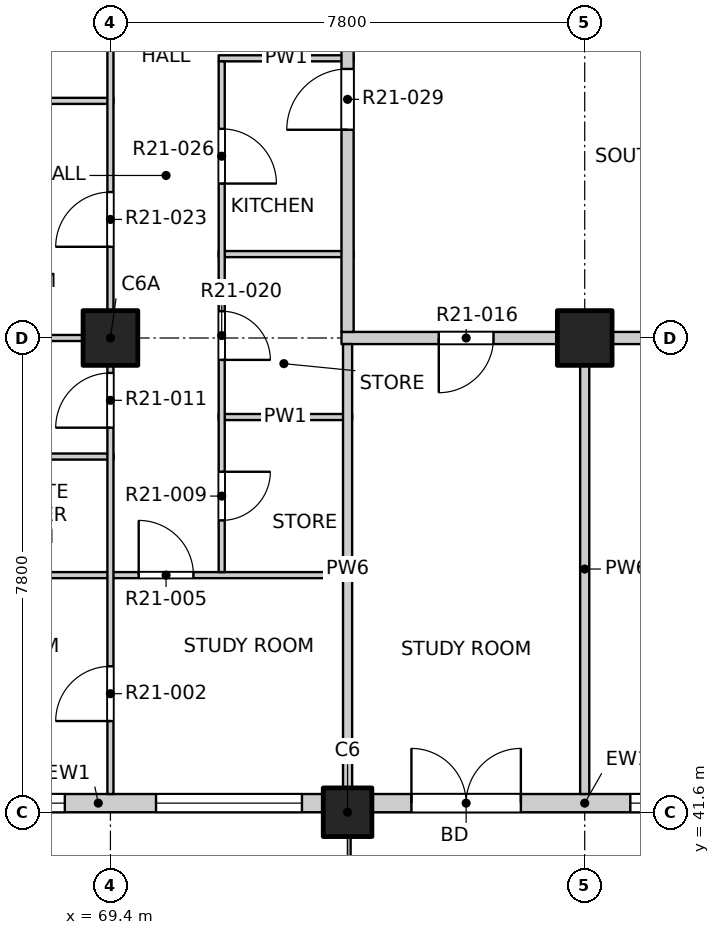
"""IFC4 building model, lengths in metres.
Left out: names, types, materials, properties, quantities, classifications, styles, units other than length and angle.
Written with IfcOpenShell. Run it as: python <this file> out.ifc"""

import sys

from ifc_helpers import new_model, si_unit, direction, frame, frame_2d, origin, origin_2d, place, context, subcontext, project, spatial, rectangle, extrude, element, fill, save


model = new_model("IFC4")
c1 = context("Model", 3, precision=1e-05, world=origin(), true_north=direction((0.0, 1.0)))
c2 = subcontext(c1, "Body", "Model", "MODEL_VIEW")
j1 = project(units=[si_unit("LENGTHUNIT", "METRE"), si_unit("PLANEANGLEUNIT", "RADIAN")], contexts=[c1])
p1 = place(None, origin())
s1 = spatial("IfcSite", under=j1, at=p1, CompositionType="ELEMENT")
p2 = place(p1, origin())
s2 = spatial("IfcBuilding", under=s1, at=p2, CompositionType="ELEMENT")
p3 = place(p2, frame((0.0, 0.0, 214.3)))
s3 = spatial("IfcBuildingStorey", under=s2, at=p3, CompositionType="ELEMENT", Elevation=214.3)
p4 = place(p3, frame((73.3, 41.6, -0.25), z_axis=(0.0, 0.0, 1.0), x_axis=(1.0, 0.0, 0.0)))
e1 = element("IfcColumn", 1, at=p4, inside=s3, PredefinedType="COLUMN", context=c2, shape_type="SweptSolid", body=[
    extrude(rectangle(XDim=0.8, YDim=0.8, at=origin_2d()), origin(), (0.0, 0.0, 1.0), 3.4),
])
for number, where, z_axis, x_axis in (
    (2, (69.4, 49.4, -0.25), (0.0, 0.0, 1.0), (1.0, 0.0, 0.0)),
    (3, (77.2, 49.4, -0.25), (0.0, 0.0, 1.0), (1.0, 0.0, 0.0)),
):
    element("IfcColumn", number, at=place(p3, frame(where, z_axis=z_axis, x_axis=x_axis)), inside=s3, PredefinedType="COLUMN", context=c2, shape_type="SweptSolid", body=[
        extrude(rectangle(XDim=0.9, YDim=0.9, at=origin_2d()), origin(), (0.0, 0.0, 1.0), 3.4),
    ])
p5 = place(p3, frame((65.5, 41.75, 0.0), z_axis=(0.0, 0.0, 1.0), x_axis=(1.0, 0.0, 0.0)))
e4 = element("IfcWall", 4, at=p5, inside=s3, PredefinedType="SOLIDWALL", context=c2, shape_type="SweptSolid", body=[
    extrude(rectangle(XDim=7.4, YDim=0.3, at=frame_2d((3.7, 0.0))), origin(), (0.0, 0.0, 1.0), 2.7),
])
p6 = place(p5, frame((0.75, 0.0, 0.9)))
e5 = element("IfcOpeningElement", 5, at=p6, cuts=e4, PredefinedType="OPENING", context=c2, shape_type="SweptSolid", body=[
    extrude(rectangle(XDim=2.4, YDim=1.8, at=frame_2d((1.2, 0.9))), frame((0.0, 0.16, 0.0), z_axis=(0.0, -1.0, 0.0), x_axis=(1.0, 0.0, 0.0)), (0.0, 0.0, 1.0), 0.32),
])
p7 = place(p5, frame((4.65, 0.0, 0.9)))
e6 = element("IfcOpeningElement", 6, at=p7, cuts=e4, PredefinedType="OPENING", context=c2, shape_type="SweptSolid", body=[
    extrude(rectangle(XDim=2.4, YDim=1.8, at=frame_2d((1.2, 0.9))), frame((0.0, 0.16, 0.0), z_axis=(0.0, -1.0, 0.0), x_axis=(1.0, 0.0, 0.0)), (0.0, 0.0, 1.0), 0.32),
])
p8 = place(p3, frame((73.7, 41.75, 0.0), z_axis=(0.0, 0.0, 1.0), x_axis=(1.0, 0.0, 0.0)))
e7 = element("IfcWall", 7, at=p8, inside=s3, PredefinedType="SOLIDWALL", context=c2, shape_type="SweptSolid", body=[
    extrude(rectangle(XDim=7.0, YDim=0.3, at=frame_2d((3.5, 0.0))), origin(), (0.0, 0.0, 1.0), 2.7),
])
p9 = place(p8, frame((0.65, 0.0, 0.0)))
e8 = element("IfcOpeningElement", 8, at=p9, cuts=e7, PredefinedType="OPENING", context=c2, shape_type="SweptSolid", body=[
    extrude(rectangle(XDim=1.8, YDim=2.4, at=frame_2d((0.9, 1.2))), frame((0.0, 0.16, 0.0), z_axis=(0.0, -1.0, 0.0), x_axis=(1.0, 0.0, 0.0)), (0.0, 0.0, 1.0), 0.32),
])
p10 = place(p8, frame((4.25, 0.0, 0.9)))
e9 = element("IfcOpeningElement", 9, at=p10, cuts=e7, PredefinedType="OPENING", context=c2, shape_type="SweptSolid", body=[
    extrude(rectangle(XDim=2.4, YDim=1.8, at=frame_2d((1.2, 0.9))), frame((0.0, 0.16, 0.0), z_axis=(0.0, -1.0, 0.0), x_axis=(1.0, 0.0, 0.0)), (0.0, 0.0, 1.0), 0.32),
])
p11 = place(p3, frame((61.9, 45.5, 0.0), z_axis=(0.0, 0.0, 1.0), x_axis=(1.0, 0.0, 0.0)))
e10 = element("IfcWall", 10, at=p11, inside=s3, PredefinedType="PARTITIONING", context=c2, shape_type="SweptSolid", body=[
    extrude(rectangle(XDim=11.475, YDim=0.1, at=frame_2d((5.737, 0.0))), origin(), (0.0, 0.0, 1.0), 3.15),
])
p12 = place(p11, frame((7.965, 0.0, 0.0)))
e11 = element("IfcOpeningElement", 11, at=p12, cuts=e10, PredefinedType="OPENING", context=c2, shape_type="SweptSolid", body=[
    extrude(rectangle(XDim=0.9, YDim=2.1, at=frame_2d((0.45, 1.05))), frame((0.0, 0.06, 0.0), z_axis=(0.0, -1.0, 0.0), x_axis=(1.0, 0.0, 0.0)), (0.0, 0.0, 1.0), 0.12),
])
p13 = place(p3, frame((65.9, 47.45, 0.0), z_axis=(0.0, 0.0, 1.0), x_axis=(1.0, 0.0, 0.0)))
e12 = element("IfcWall", 12, at=p13, inside=s3, PredefinedType="PARTITIONING", context=c2, shape_type="SweptSolid", body=[
    extrude(rectangle(XDim=3.55, YDim=0.1, at=frame_2d((1.775, 0.0))), origin(), (0.0, 0.0, 1.0), 3.15),
])
p14 = place(p3, frame((71.18, 48.1, 0.0), z_axis=(0.0, 0.0, 1.0), x_axis=(1.0, 0.0, 0.0)))
e13 = element("IfcWall", 13, at=p14, inside=s3, PredefinedType="PARTITIONING", context=c2, shape_type="SweptSolid", body=[
    extrude(rectangle(XDim=2.195, YDim=0.1, at=frame_2d((1.097, 0.0))), origin(), (0.0, 0.0, 1.0), 3.15),
])
p15 = place(p3, frame((61.9, 49.4, 0.0), z_axis=(0.0, 0.0, 1.0), x_axis=(1.0, 0.0, 0.0)))
e14 = element("IfcWall", 14, at=p15, inside=s3, PredefinedType="PARTITIONING", context=c2, shape_type="SweptSolid", body=[
    extrude(rectangle(XDim=7.55, YDim=0.1, at=frame_2d((3.775, 0.0))), origin(), (0.0, 0.0, 1.0), 3.15),
])
p16 = place(p3, frame((73.2, 49.4, 0.0), z_axis=(0.0, 0.0, 1.0), x_axis=(1.0, 0.0, 0.0)))
e15 = element("IfcWall", 15, at=p16, inside=s3, PredefinedType="PARTITIONING", context=c2, shape_type="SweptSolid", body=[
    extrude(rectangle(XDim=23.6, YDim=0.2, at=frame_2d((11.8, 0.0))), origin(), (0.0, 0.0, 1.0), 3.15),
])
p17 = place(p16, frame((1.6, 0.0, 0.0)))
e16 = element("IfcOpeningElement", 16, at=p17, cuts=e15, PredefinedType="OPENING", context=c2, shape_type="SweptSolid", body=[
    extrude(rectangle(XDim=0.9, YDim=2.1, at=frame_2d((0.45, 1.05))), frame((0.0, 0.11, 0.0), z_axis=(0.0, -1.0, 0.0), x_axis=(1.0, 0.0, 0.0)), (0.0, 0.0, 1.0), 0.22),
])
p18 = place(p16, frame((7.3, 0.0, 0.0)))
e17 = element("IfcOpeningElement", 17, at=p18, cuts=e15, PredefinedType="OPENING", context=c2, shape_type="SweptSolid", body=[
    extrude(rectangle(XDim=1.2, YDim=2.1, at=frame_2d((0.6, 1.05))), frame((0.0, 0.11, 0.0), z_axis=(0.0, -1.0, 0.0), x_axis=(1.0, 0.0, 0.0)), (0.0, 0.0, 1.0), 0.22),
])
p19 = place(p16, frame((13.3, 0.0, 0.0)))
e18 = element("IfcOpeningElement", 18, at=p19, cuts=e15, PredefinedType="OPENING", context=c2, shape_type="SweptSolid", body=[
    extrude(rectangle(XDim=0.9, YDim=2.1, at=frame_2d((0.45, 1.05))), frame((0.0, 0.11, 0.0), z_axis=(0.0, -1.0, 0.0), x_axis=(1.0, 0.0, 0.0)), (0.0, 0.0, 1.0), 0.22),
])
p20 = place(p16, frame((20.175, 0.0, 0.0)))
e19 = element("IfcOpeningElement", 19, at=p20, cuts=e15, PredefinedType="OPENING", context=c2, shape_type="SweptSolid", body=[
    extrude(rectangle(XDim=1.2, YDim=2.1, at=frame_2d((0.6, 1.05))), frame((0.0, 0.11, 0.0), z_axis=(0.0, -1.0, 0.0), x_axis=(1.0, 0.0, 0.0)), (0.0, 0.0, 1.0), 0.22),
])
p21 = place(p3, frame((71.18, 50.78, 0.0), z_axis=(0.0, 0.0, 1.0), x_axis=(1.0, 0.0, 0.0)))
e20 = element("IfcWall", 20, at=p21, inside=s3, PredefinedType="PARTITIONING", context=c2, shape_type="SweptSolid", body=[
    extrude(rectangle(XDim=2.22, YDim=0.1, at=frame_2d((1.11, 0.0))), origin(), (0.0, 0.0, 1.0), 3.15),
])
p22 = place(p3, frame((61.9, 53.3, 0.0), z_axis=(0.0, 0.0, 1.0), x_axis=(1.0, 0.0, 0.0)))
e21 = element("IfcWall", 21, at=p22, inside=s3, PredefinedType="PARTITIONING", context=c2, shape_type="SweptSolid", body=[
    extrude(rectangle(XDim=7.55, YDim=0.1, at=frame_2d((3.775, 0.0))), origin(), (0.0, 0.0, 1.0), 3.15),
])
p23 = place(p3, frame((71.18, 54.0, 0.0), z_axis=(0.0, 0.0, 1.0), x_axis=(1.0, 0.0, 0.0)))
e22 = element("IfcWall", 22, at=p23, inside=s3, PredefinedType="PARTITIONING", context=c2, shape_type="SweptSolid", body=[
    extrude(rectangle(XDim=2.22, YDim=0.1, at=frame_2d((1.11, 0.0))), origin(), (0.0, 0.0, 1.0), 3.15),
])
p24 = place(p3, frame((69.4, 41.9, 0.0), z_axis=(0.0, 0.0, 1.0), x_axis=(0.0, 1.0, 0.0)))
e23 = element("IfcWall", 23, at=p24, inside=s3, PredefinedType="PARTITIONING", context=c2, shape_type="SweptSolid", body=[
    extrude(rectangle(XDim=46.2, YDim=0.1, at=frame_2d((23.1, 0.0))), origin(), (0.0, 0.0, 1.0), 3.15),
])
p25 = place(p24, frame((1.2, 0.0, 0.0)))
e24 = element("IfcOpeningElement", 24, at=p25, cuts=e23, PredefinedType="OPENING", context=c2, shape_type="SweptSolid", body=[
    extrude(rectangle(XDim=0.9, YDim=2.1, at=frame_2d((0.45, 1.05))), frame((0.0, 0.06, 0.0), z_axis=(0.0, -1.0, 0.0), x_axis=(1.0, 0.0, 0.0)), (0.0, 0.0, 1.0), 0.12),
])
p26 = place(p24, frame((6.025, 0.0, 0.0)))
e25 = element("IfcOpeningElement", 25, at=p26, cuts=e23, PredefinedType="OPENING", context=c2, shape_type="SweptSolid", body=[
    extrude(rectangle(XDim=0.9, YDim=2.1, at=frame_2d((0.45, 1.05))), frame((0.0, 0.06, 0.0), z_axis=(0.0, -1.0, 0.0), x_axis=(1.0, 0.0, 0.0)), (0.0, 0.0, 1.0), 0.12),
])
p27 = place(p24, frame((9.0, 0.0, 0.0)))
e26 = element("IfcOpeningElement", 26, at=p27, cuts=e23, PredefinedType="OPENING", context=c2, shape_type="SweptSolid", body=[
    extrude(rectangle(XDim=0.9, YDim=2.1, at=frame_2d((0.45, 1.05))), frame((0.0, 0.06, 0.0), z_axis=(0.0, -1.0, 0.0), x_axis=(1.0, 0.0, 0.0)), (0.0, 0.0, 1.0), 0.12),
])
p28 = place(p24, frame((12.9, 0.0, 0.0)))
e27 = element("IfcOpeningElement", 27, at=p28, cuts=e23, PredefinedType="OPENING", context=c2, shape_type="SweptSolid", body=[
    extrude(rectangle(XDim=0.9, YDim=2.1, at=frame_2d((0.45, 1.05))), frame((0.0, 0.06, 0.0), z_axis=(0.0, -1.0, 0.0), x_axis=(1.0, 0.0, 0.0)), (0.0, 0.0, 1.0), 0.12),
])
p29 = place(p24, frame((17.775, 0.0, 0.0)))
e28 = element("IfcOpeningElement", 28, at=p29, cuts=e23, PredefinedType="OPENING", context=c2, shape_type="SweptSolid", body=[
    extrude(rectangle(XDim=0.9, YDim=2.1, at=frame_2d((0.45, 1.05))), frame((0.0, 0.06, 0.0), z_axis=(0.0, -1.0, 0.0), x_axis=(1.0, 0.0, 0.0)), (0.0, 0.0, 1.0), 0.12),
])
p30 = place(p24, frame((20.7, 0.0, 0.0)))
e29 = element("IfcOpeningElement", 29, at=p30, cuts=e23, PredefinedType="OPENING", context=c2, shape_type="SweptSolid", body=[
    extrude(rectangle(XDim=0.9, YDim=2.1, at=frame_2d((0.45, 1.05))), frame((0.0, 0.06, 0.0), z_axis=(0.0, -1.0, 0.0), x_axis=(1.0, 0.0, 0.0)), (0.0, 0.0, 1.0), 0.12),
])
p31 = place(p24, frame((24.6, 0.0, 0.0)))
e30 = element("IfcOpeningElement", 30, at=p31, cuts=e23, PredefinedType="OPENING", context=c2, shape_type="SweptSolid", body=[
    extrude(rectangle(XDim=0.9, YDim=2.1, at=frame_2d((0.45, 1.05))), frame((0.0, 0.06, 0.0), z_axis=(0.0, -1.0, 0.0), x_axis=(1.0, 0.0, 0.0)), (0.0, 0.0, 1.0), 0.12),
])
p32 = place(p24, frame((29.425, 0.0, 0.0)))
e31 = element("IfcOpeningElement", 31, at=p32, cuts=e23, PredefinedType="OPENING", context=c2, shape_type="SweptSolid", body=[
    extrude(rectangle(XDim=0.9, YDim=2.1, at=frame_2d((0.45, 1.05))), frame((0.0, 0.06, 0.0), z_axis=(0.0, -1.0, 0.0), x_axis=(1.0, 0.0, 0.0)), (0.0, 0.0, 1.0), 0.12),
])
p33 = place(p24, frame((33.375, 0.0, 0.0)))
e32 = element("IfcOpeningElement", 32, at=p33, cuts=e23, PredefinedType="OPENING", context=c2, shape_type="SweptSolid", body=[
    extrude(rectangle(XDim=0.9, YDim=2.1, at=frame_2d((0.45, 1.05))), frame((0.0, 0.06, 0.0), z_axis=(0.0, -1.0, 0.0), x_axis=(1.0, 0.0, 0.0)), (0.0, 0.0, 1.0), 0.12),
])
p34 = place(p24, frame((36.3, 0.0, 0.0)))
e33 = element("IfcOpeningElement", 33, at=p34, cuts=e23, PredefinedType="OPENING", context=c2, shape_type="SweptSolid", body=[
    extrude(rectangle(XDim=0.9, YDim=2.1, at=frame_2d((0.45, 1.05))), frame((0.0, 0.06, 0.0), z_axis=(0.0, -1.0, 0.0), x_axis=(1.0, 0.0, 0.0)), (0.0, 0.0, 1.0), 0.12),
])
p35 = place(p24, frame((41.175, 0.0, 0.0)))
e34 = element("IfcOpeningElement", 34, at=p35, cuts=e23, PredefinedType="OPENING", context=c2, shape_type="SweptSolid", body=[
    extrude(rectangle(XDim=0.9, YDim=2.1, at=frame_2d((0.45, 1.05))), frame((0.0, 0.06, 0.0), z_axis=(0.0, -1.0, 0.0), x_axis=(1.0, 0.0, 0.0)), (0.0, 0.0, 1.0), 0.12),
])
p36 = place(p24, frame((44.1, 0.0, 0.0)))
e35 = element("IfcOpeningElement", 35, at=p36, cuts=e23, PredefinedType="OPENING", context=c2, shape_type="SweptSolid", body=[
    extrude(rectangle(XDim=0.9, YDim=2.1, at=frame_2d((0.45, 1.05))), frame((0.0, 0.06, 0.0), z_axis=(0.0, -1.0, 0.0), x_axis=(1.0, 0.0, 0.0)), (0.0, 0.0, 1.0), 0.12),
])
p37 = place(p3, frame((71.23, 45.55, 0.0), z_axis=(0.0, 0.0, 1.0), x_axis=(0.0, 1.0, 0.0)))
e36 = element("IfcWall", 36, at=p37, inside=s3, PredefinedType="PARTITIONING", context=c2, shape_type="SweptSolid", body=[
    extrude(rectangle(XDim=8.4, YDim=0.1, at=frame_2d((4.2, 0.0))), origin(), (0.0, 0.0, 1.0), 3.15),
])
p38 = place(p37, frame((0.85, 0.0, 0.0)))
e37 = element("IfcOpeningElement", 37, at=p38, cuts=e36, PredefinedType="OPENING", context=c2, shape_type="SweptSolid", body=[
    extrude(rectangle(XDim=0.8, YDim=2.1, at=frame_2d((0.4, 1.05))), frame((0.0, 0.06, 0.0), z_axis=(0.0, -1.0, 0.0), x_axis=(1.0, 0.0, 0.0)), (0.0, 0.0, 1.0), 0.12),
])
p39 = place(p37, frame((3.49, 0.0, 0.0)))
e38 = element("IfcOpeningElement", 38, at=p39, cuts=e36, PredefinedType="OPENING", context=c2, shape_type="SweptSolid", body=[
    extrude(rectangle(XDim=0.8, YDim=2.1, at=frame_2d((0.4, 1.05))), frame((0.0, 0.06, 0.0), z_axis=(0.0, -1.0, 0.0), x_axis=(1.0, 0.0, 0.0)), (0.0, 0.0, 1.0), 0.12),
])
p40 = place(p37, frame((6.39, 0.0, 0.0)))
e39 = element("IfcOpeningElement", 39, at=p40, cuts=e36, PredefinedType="OPENING", context=c2, shape_type="SweptSolid", body=[
    extrude(rectangle(XDim=0.9, YDim=2.1, at=frame_2d((0.45, 1.05))), frame((0.0, 0.06, 0.0), z_axis=(0.0, -1.0, 0.0), x_axis=(1.0, 0.0, 0.0)), (0.0, 0.0, 1.0), 0.12),
])
p41 = place(p3, frame((73.3, 41.9, 0.0), z_axis=(0.0, 0.0, 1.0), x_axis=(0.0, 1.0, 0.0)))
e40 = element("IfcWall", 40, at=p41, inside=s3, PredefinedType="PARTITIONING", context=c2, shape_type="SweptSolid", body=[
    extrude(rectangle(XDim=7.4, YDim=0.15, at=frame_2d((3.7, 0.0))), origin(), (0.0, 0.0, 1.0), 3.15),
])
p42 = place(p3, frame((73.3, 49.5, 0.0), z_axis=(0.0, 0.0, 1.0), x_axis=(0.0, 1.0, 0.0)))
e41 = element("IfcWall", 41, at=p42, inside=s3, PredefinedType="PARTITIONING", context=c2, shape_type="SweptSolid", body=[
    extrude(rectangle(XDim=34.9, YDim=0.2, at=frame_2d((17.45, 0.0))), origin(), (0.0, 0.0, 1.0), 3.15),
])
p43 = place(p42, frame((3.325, 0.0, 0.0)))
e42 = element("IfcOpeningElement", 42, at=p43, cuts=e41, PredefinedType="OPENING", context=c2, shape_type="SweptSolid", body=[
    extrude(rectangle(XDim=1.0, YDim=2.1, at=frame_2d((0.5, 1.05))), frame((0.0, 0.11, 0.0), z_axis=(0.0, -1.0, 0.0), x_axis=(1.0, 0.0, 0.0)), (0.0, 0.0, 1.0), 0.22),
])
p44 = place(p42, frame((18.875, 0.0, 0.0)))
e43 = element("IfcOpeningElement", 43, at=p44, cuts=e41, PredefinedType="OPENING", context=c2, shape_type="SweptSolid", body=[
    extrude(rectangle(XDim=1.0, YDim=2.1, at=frame_2d((0.5, 1.05))), frame((0.0, 0.11, 0.0), z_axis=(0.0, -1.0, 0.0), x_axis=(1.0, 0.0, 0.0)), (0.0, 0.0, 1.0), 0.22),
])
p45 = place(p42, frame((29.325, 0.0, 0.0)))
e44 = element("IfcOpeningElement", 44, at=p45, cuts=e41, PredefinedType="OPENING", context=c2, shape_type="SweptSolid", body=[
    extrude(rectangle(XDim=1.0, YDim=2.1, at=frame_2d((0.5, 1.05))), frame((0.0, 0.11, 0.0), z_axis=(0.0, -1.0, 0.0), x_axis=(1.0, 0.0, 0.0)), (0.0, 0.0, 1.0), 0.22),
])
p46 = place(p3, frame((77.2, 41.9, 0.0), z_axis=(0.0, 0.0, 1.0), x_axis=(0.0, 1.0, 0.0)))
e45 = element("IfcWall", 45, at=p46, inside=s3, PredefinedType="PARTITIONING", context=c2, shape_type="SweptSolid", body=[
    extrude(rectangle(XDim=7.4, YDim=0.15, at=frame_2d((3.7, 0.0))), origin(), (0.0, 0.0, 1.0), 3.15),
])
p47 = place(p6, origin())
e46 = element("IfcWindow", 46, at=p47, inside=s3, PartitioningType="DOUBLE_PANEL_VERTICAL", PredefinedType="WINDOW", context=c2, shape_type="SweptSolid", body=[
    extrude(rectangle(XDim=2.4, YDim=1.8, at=frame_2d((1.2, 0.9))), frame((0.0, 0.03, 0.0), z_axis=(0.0, -1.0, 0.0), x_axis=(1.0, 0.0, 0.0)), (0.0, 0.0, 1.0), 0.06),
])
fill(e5, e46)
p48 = place(p7, origin())
e47 = element("IfcWindow", 47, at=p48, inside=s3, PartitioningType="DOUBLE_PANEL_VERTICAL", PredefinedType="WINDOW", context=c2, shape_type="SweptSolid", body=[
    extrude(rectangle(XDim=2.4, YDim=1.8, at=frame_2d((1.2, 0.9))), frame((0.0, 0.03, 0.0), z_axis=(0.0, -1.0, 0.0), x_axis=(1.0, 0.0, 0.0)), (0.0, 0.0, 1.0), 0.06),
])
fill(e6, e47)
p49 = place(p9, origin())
e48 = element("IfcDoor", 48, at=p49, inside=s3, OperationType="DOUBLE_DOOR_SINGLE_SWING", PredefinedType="DOOR", context=c2, shape_type="SweptSolid", body=[
    extrude(rectangle(XDim=1.8, YDim=2.4, at=frame_2d((0.9, 1.2))), frame((0.0, 0.025, 0.0), z_axis=(0.0, -1.0, 0.0), x_axis=(1.0, 0.0, 0.0)), (0.0, 0.0, 1.0), 0.05),
])
fill(e8, e48)
p50 = place(p10, origin())
e49 = element("IfcWindow", 49, at=p50, inside=s3, PartitioningType="DOUBLE_PANEL_VERTICAL", PredefinedType="WINDOW", context=c2, shape_type="SweptSolid", body=[
    extrude(rectangle(XDim=2.4, YDim=1.8, at=frame_2d((1.2, 0.9))), frame((0.0, 0.03, 0.0), z_axis=(0.0, -1.0, 0.0), x_axis=(1.0, 0.0, 0.0)), (0.0, 0.0, 1.0), 0.06),
])
fill(e9, e49)
p51 = place(p25, origin())
e50 = element("IfcDoor", 50, at=p51, inside=s3, OperationType="SINGLE_SWING_LEFT", PredefinedType="DOOR", context=c2, shape_type="SweptSolid", body=[
    extrude(rectangle(XDim=0.9, YDim=2.1, at=frame_2d((0.45, 1.05))), frame((0.0, 0.025, 0.0), z_axis=(0.0, -1.0, 0.0), x_axis=(1.0, 0.0, 0.0)), (0.0, 0.0, 1.0), 0.05),
])
fill(e24, e50)
p52 = place(p12, origin())
e51 = element("IfcDoor", 51, at=p52, inside=s3, OperationType="SINGLE_SWING_LEFT", PredefinedType="DOOR", context=c2, shape_type="SweptSolid", body=[
    extrude(rectangle(XDim=0.9, YDim=2.1, at=frame_2d((0.45, 1.05))), frame((0.0, 0.025, 0.0), z_axis=(0.0, -1.0, 0.0), x_axis=(1.0, 0.0, 0.0)), (0.0, 0.0, 1.0), 0.05),
])
fill(e11, e51)
p53 = place(p38, origin())
e52 = element("IfcDoor", 52, at=p53, inside=s3, OperationType="SINGLE_SWING_LEFT", PredefinedType="DOOR", context=c2, shape_type="SweptSolid", body=[
    extrude(rectangle(XDim=0.8, YDim=2.1, at=frame_2d((0.4, 1.05))), frame((0.0, 0.025, 0.0), z_axis=(0.0, -1.0, 0.0), x_axis=(1.0, 0.0, 0.0)), (0.0, 0.0, 1.0), 0.05),
])
fill(e37, e52)
p54 = place(p26, origin())
e53 = element("IfcDoor", 53, at=p54, inside=s3, OperationType="SINGLE_SWING_LEFT", PredefinedType="DOOR", context=c2, shape_type="SweptSolid", body=[
    extrude(rectangle(XDim=0.9, YDim=2.1, at=frame_2d((0.45, 1.05))), frame((0.0, 0.025, 0.0), z_axis=(0.0, -1.0, 0.0), x_axis=(1.0, 0.0, 0.0)), (0.0, 0.0, 1.0), 0.05),
])
fill(e25, e53)
p55 = place(p17, origin())
e54 = element("IfcDoor", 54, at=p55, inside=s3, OperationType="SINGLE_SWING_RIGHT", PredefinedType="DOOR", context=c2, shape_type="SweptSolid", body=[
    extrude(rectangle(XDim=0.9, YDim=2.1, at=frame_2d((0.45, 1.05))), frame((0.0, 0.025, 0.0), z_axis=(0.0, -1.0, 0.0), x_axis=(1.0, 0.0, 0.0)), (0.0, 0.0, 1.0), 0.05),
])
fill(e16, e54)
p56 = place(p39, origin())
e55 = element("IfcDoor", 55, at=p56, inside=s3, OperationType="SINGLE_SWING_RIGHT", PredefinedType="DOOR", context=c2, shape_type="SweptSolid", body=[
    extrude(rectangle(XDim=0.8, YDim=2.1, at=frame_2d((0.4, 1.05))), frame((0.0, 0.025, 0.0), z_axis=(0.0, -1.0, 0.0), x_axis=(1.0, 0.0, 0.0)), (0.0, 0.0, 1.0), 0.05),
])
fill(e38, e55)
p57 = place(p27, origin())
e56 = element("IfcDoor", 56, at=p57, inside=s3, OperationType="SINGLE_SWING_LEFT", PredefinedType="DOOR", context=c2, shape_type="SweptSolid", body=[
    extrude(rectangle(XDim=0.9, YDim=2.1, at=frame_2d((0.45, 1.05))), frame((0.0, 0.025, 0.0), z_axis=(0.0, -1.0, 0.0), x_axis=(1.0, 0.0, 0.0)), (0.0, 0.0, 1.0), 0.05),
])
fill(e26, e56)
p58 = place(p40, origin())
e57 = element("IfcDoor", 57, at=p58, inside=s3, OperationType="SINGLE_SWING_RIGHT", PredefinedType="DOOR", context=c2, shape_type="SweptSolid", body=[
    extrude(rectangle(XDim=0.9, YDim=2.1, at=frame_2d((0.45, 1.05))), frame((0.0, 0.025, 0.0), z_axis=(0.0, -1.0, 0.0), x_axis=(1.0, 0.0, 0.0)), (0.0, 0.0, 1.0), 0.05),
])
fill(e39, e57)
p59 = place(p43, origin())
e58 = element("IfcDoor", 58, at=p59, inside=s3, OperationType="SINGLE_SWING_LEFT", PredefinedType="DOOR", context=c2, shape_type="SweptSolid", body=[
    extrude(rectangle(XDim=1.0, YDim=2.1, at=frame_2d((0.5, 1.05))), frame((0.0, 0.025, 0.0), z_axis=(0.0, -1.0, 0.0), x_axis=(1.0, 0.0, 0.0)), (0.0, 0.0, 1.0), 0.05),
])
fill(e42, e58)
save(model, sys.argv[1])
